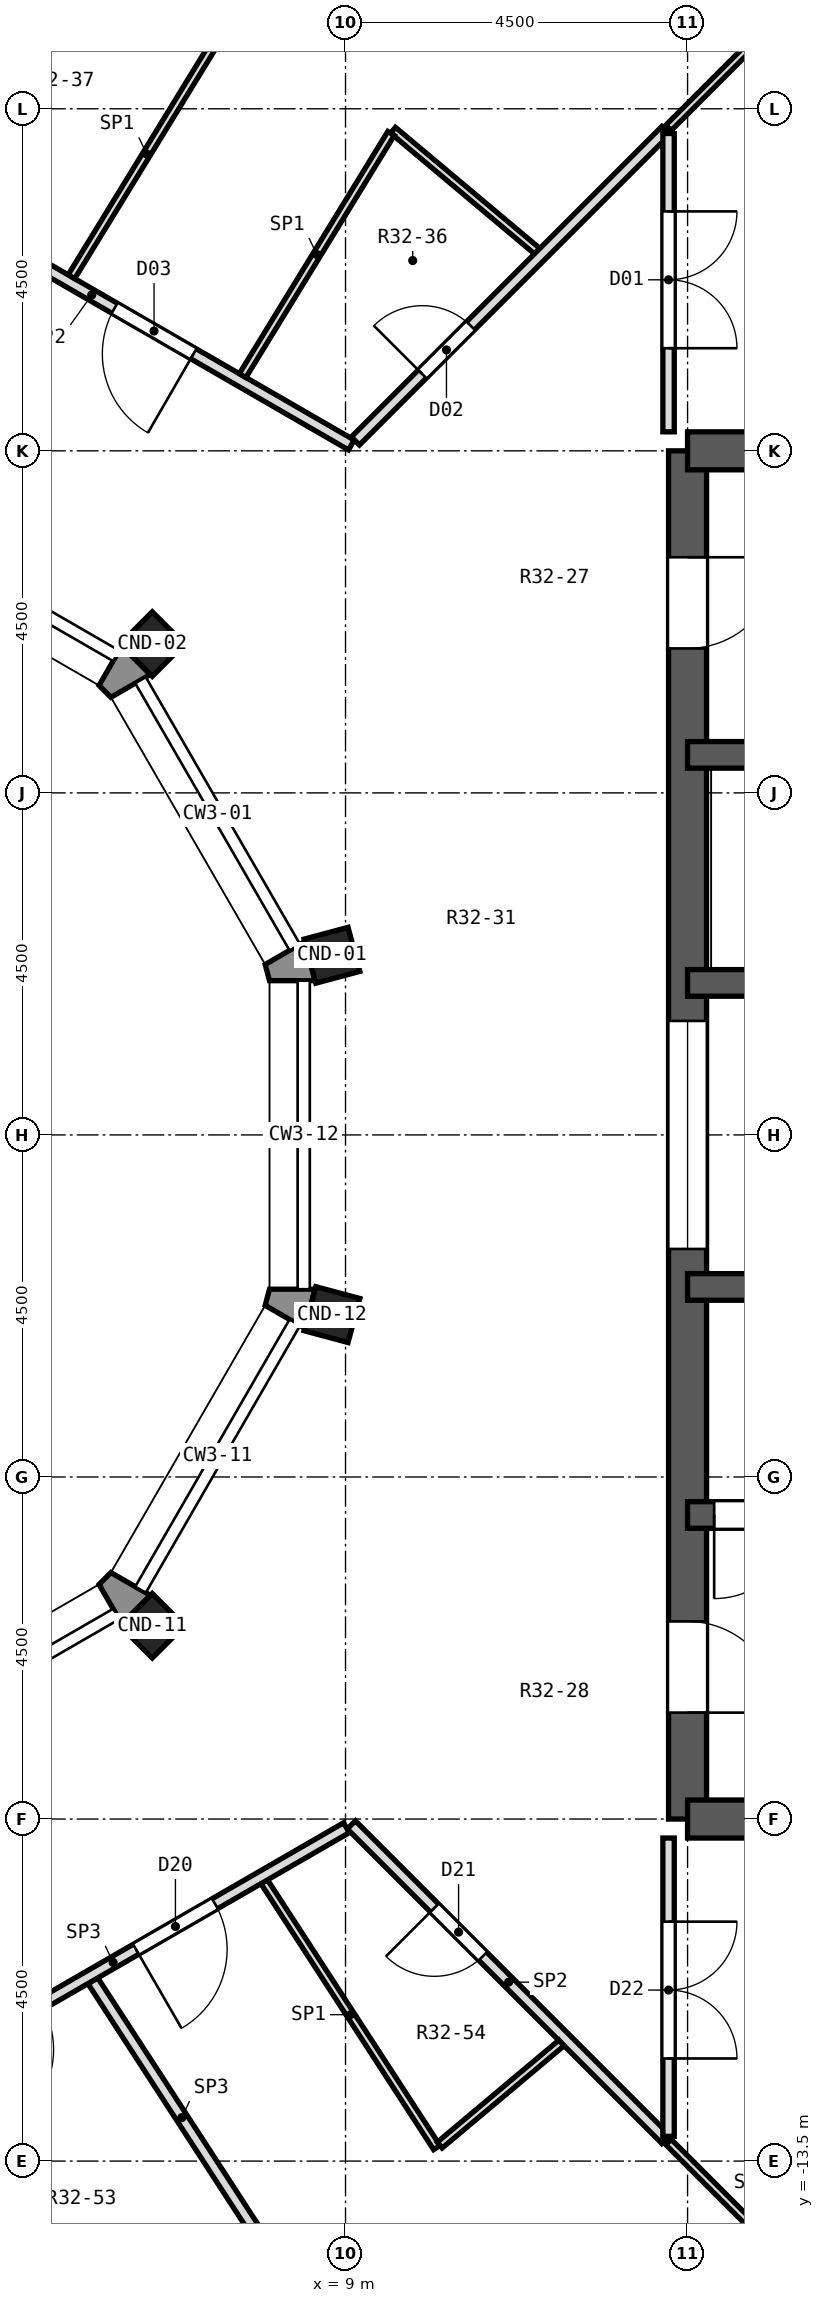
"""IFC4 building model, lengths in metres.
Left out: names, types, materials, properties, quantities, classifications, styles, units other than length and angle.
Written with IfcOpenShell. Run it as: python <this file> out.ifc"""

import sys

from ifc_helpers import new_model, si_unit, direction, frame, frame_2d, origin, origin_2d, place, context, subcontext, project, spatial, polyline, rectangle, outline, extrude, element, fill, save


model = new_model("IFC4")
c1 = context("Model", 3, precision=1e-05, world=origin(), true_north=direction((0.0, 1.0)))
c2 = subcontext(c1, "Body", "Model", "MODEL_VIEW")
j1 = project(units=[si_unit("LENGTHUNIT", "METRE"), si_unit("PLANEANGLEUNIT", "RADIAN")], contexts=[c1])
p1 = place(None, origin())
s1 = spatial("IfcSite", under=j1, at=p1, CompositionType="ELEMENT")
p2 = place(p1, origin())
s2 = spatial("IfcBuilding", under=s1, at=p2, CompositionType="ELEMENT")
p3 = place(p2, frame((0.0, 0.0, 224.7)))
s3 = spatial("IfcBuildingStorey", under=s2, at=p3, CompositionType="ELEMENT", Elevation=224.7)
for number, where, z_axis, x_axis in (
    (1, (8.821, 2.364, 0.0), (0.0, 0.0, 1.0), (0.966, 0.259, 0.0)),
    (2, (6.458, 6.458, 0.0), (0.0, 0.0, 1.0), (0.707, 0.707, 0.0)),
    (3, (6.458, -6.458, 0.0), (0.0, 0.0, 1.0), (0.707, -0.707, 0.0)),
    (4, (8.821, -2.364, 0.0), (0.0, 0.0, 1.0), (0.966, -0.259, 0.0)),
):
    element("IfcColumn", number, at=place(p3, frame(where, z_axis=z_axis, x_axis=x_axis)), inside=s3, PredefinedType="COLUMN", context=c2, shape_type="SweptSolid", body=[
        extrude(rectangle(XDim=0.6, YDim=0.6, at=origin_2d()), origin(), (0.0, 0.0, 1.0), 5.0),
    ])
p4 = place(p3, frame((13.5, -9.0, 0.0), z_axis=(0.0, 0.0, 1.0), x_axis=(0.0, 1.0, 0.0)))
e5 = element("IfcWall", 5, at=p4, inside=s3, PredefinedType="SHEAR", context=c2, shape_type="SweptSolid", body=[
    extrude(rectangle(XDim=18.0, YDim=0.5, at=frame_2d((9.0, 0.0))), origin(), (0.0, 0.0, 1.0), 5.0),
])
p5 = place(p4, frame((15.4, 0.0, 0.0)))
e6 = element("IfcOpeningElement", 6, at=p5, cuts=e5, PredefinedType="OPENING", context=c2, shape_type="SweptSolid", body=[
    extrude(rectangle(XDim=1.2, YDim=2.1, at=frame_2d((0.6, 1.05))), frame((0.0, 0.262, 0.0), z_axis=(0.0, -1.0, 0.0), x_axis=(1.0, 0.0, 0.0)), (0.0, 0.0, 1.0), 0.524),
])
p6 = place(p4, frame((1.4, 0.0, 0.0)))
e7 = element("IfcOpeningElement", 7, at=p6, cuts=e5, PredefinedType="OPENING", context=c2, shape_type="SweptSolid", body=[
    extrude(rectangle(XDim=1.2, YDim=2.1, at=frame_2d((0.6, 1.05))), frame((0.0, 0.262, 0.0), z_axis=(0.0, -1.0, 0.0), x_axis=(1.0, 0.0, 0.0)), (0.0, 0.0, 1.0), 0.524),
])
p7 = place(p4, frame((7.5, 0.0, 0.0)))
e8 = element("IfcOpeningElement", 8, at=p7, cuts=e5, PredefinedType="OPENING", context=c2, shape_type="SweptSolid", body=[
    extrude(rectangle(XDim=3.0, YDim=2.4, at=frame_2d((1.5, 1.2))), frame((0.0, 0.262, 0.0), z_axis=(0.0, -1.0, 0.0), x_axis=(1.0, 0.0, 0.0)), (0.0, 0.0, 1.0), 0.524),
])
for number, where, z_axis, x_axis in (
    (9, (13.5, 9.0, 0.0), (0.0, 0.0, 1.0), (1.0, 0.0, 0.0)),
    (10, (13.5, -9.0, 0.0), (0.0, 0.0, 1.0), (1.0, 0.0, 0.0)),
):
    element("IfcWall", number, at=place(p3, frame(where, z_axis=z_axis, x_axis=x_axis)), inside=s3, PredefinedType="SHEAR", context=c2, shape_type="SweptSolid", body=[
        extrude(rectangle(XDim=6.0, YDim=0.5, at=frame_2d((3.0, 0.0))), origin(), (0.0, 0.0, 1.0), 5.0),
    ])
p8 = place(p3, frame((13.5, 5.0, 0.0), z_axis=(0.0, 0.0, 1.0), x_axis=(1.0, 0.0, 0.0)))
e11 = element("IfcWall", 11, at=p8, inside=s3, PredefinedType="SHEAR", context=c2, shape_type="SweptSolid", body=[
    extrude(rectangle(XDim=6.0, YDim=0.35, at=frame_2d((3.0, 0.0))), origin(), (0.0, 0.0, 1.0), 5.0),
])
p9 = place(p3, frame((13.5, -5.0, 0.0), z_axis=(0.0, 0.0, 1.0), x_axis=(1.0, 0.0, 0.0)))
e12 = element("IfcWall", 12, at=p9, inside=s3, PredefinedType="SHEAR", context=c2, shape_type="SweptSolid", body=[
    extrude(rectangle(XDim=6.0, YDim=0.35, at=frame_2d((3.0, 0.0))), origin(), (0.0, 0.0, 1.0), 5.0),
])
p10 = place(p9, frame((0.35, 0.0, 0.0)))
e13 = element("IfcOpeningElement", 13, at=p10, cuts=e12, PredefinedType="OPENING", context=c2, shape_type="SweptSolid", body=[
    extrude(rectangle(XDim=1.1, YDim=2.1, at=frame_2d((0.55, 1.05))), frame((0.0, 0.187, 0.0), z_axis=(0.0, -1.0, 0.0), x_axis=(1.0, 0.0, 0.0)), (0.0, 0.0, 1.0), 0.374),
])
p11 = place(p3, frame((13.5, 2.0, 0.0), z_axis=(0.0, 0.0, 1.0), x_axis=(1.0, 0.0, 0.0)))
e14 = element("IfcWall", 14, at=p11, inside=s3, PredefinedType="SHEAR", context=c2, shape_type="SweptSolid", body=[
    extrude(rectangle(XDim=6.0, YDim=0.35, at=frame_2d((3.0, 0.0))), origin(), (0.0, 0.0, 1.0), 5.0),
])
p12 = place(p11, frame((1.37, 0.0, 0.0)))
e15 = element("IfcOpeningElement", 15, at=p12, cuts=e14, PredefinedType="OPENING", context=c2, shape_type="SweptSolid", body=[
    extrude(rectangle(XDim=1.1, YDim=2.1, at=frame_2d((0.55, 1.05))), frame((0.0, 0.187, 0.0), z_axis=(0.0, -1.0, 0.0), x_axis=(1.0, 0.0, 0.0)), (0.0, 0.0, 1.0), 0.374),
])
p13 = place(p11, frame((3.09, 0.0, 0.0)))
e16 = element("IfcOpeningElement", 16, at=p13, cuts=e14, PredefinedType="OPENING", context=c2, shape_type="SweptSolid", body=[
    extrude(rectangle(XDim=1.1, YDim=2.1, at=frame_2d((0.55, 1.05))), frame((0.0, 0.187, 0.0), z_axis=(0.0, -1.0, 0.0), x_axis=(1.0, 0.0, 0.0)), (0.0, 0.0, 1.0), 0.374),
])
p14 = place(p11, frame((5.105, 0.0, 0.0)))
e17 = element("IfcOpeningElement", 17, at=p14, cuts=e14, PredefinedType="OPENING", context=c2, shape_type="SweptSolid", body=[
    extrude(rectangle(XDim=0.6, YDim=2.1, at=frame_2d((0.3, 1.05))), frame((0.0, 0.187, 0.0), z_axis=(0.0, -1.0, 0.0), x_axis=(1.0, 0.0, 0.0)), (0.0, 0.0, 1.0), 0.374),
])
p15 = place(p3, frame((13.5, -2.0, 0.0), z_axis=(0.0, 0.0, 1.0), x_axis=(1.0, 0.0, 0.0)))
e18 = element("IfcWall", 18, at=p15, inside=s3, PredefinedType="SHEAR", context=c2, shape_type="SweptSolid", body=[
    extrude(rectangle(XDim=6.0, YDim=0.35, at=frame_2d((3.0, 0.0))), origin(), (0.0, 0.0, 1.0), 5.0),
])
p16 = place(p15, frame((1.14, 0.0, 0.0)))
e19 = element("IfcOpeningElement", 19, at=p16, cuts=e18, PredefinedType="OPENING", context=c2, shape_type="SweptSolid", body=[
    extrude(rectangle(XDim=1.0, YDim=2.1, at=frame_2d((0.5, 1.05))), frame((0.0, 0.187, 0.0), z_axis=(0.0, -1.0, 0.0), x_axis=(1.0, 0.0, 0.0)), (0.0, 0.0, 1.0), 0.374),
])
p17 = place(p3, origin())
e20 = element("IfcWall", 20, at=p17, inside=s3, PredefinedType="SOLIDWALL", context=c2, shape_type="SweptSolid", body=[
    extrude(outline(polyline([(8.462, 2.542), (7.943, 2.242), (8.0, 2.029), (8.6, 2.029), (8.462, 2.542)])), origin(), (0.0, 0.0, 1.0), 4.6),
])
p18 = place(p3, origin())
e21 = element("IfcWall", 21, at=p18, inside=s3, PredefinedType="SOLIDWALL", context=c2, shape_type="SweptSolid", body=[
    extrude(outline(polyline([(6.058, 6.433), (5.758, 5.914), (5.914, 5.758), (6.433, 6.058), (6.058, 6.433)])), origin(), (0.0, 0.0, 1.0), 4.6),
])
p19 = place(p3, origin())
e22 = element("IfcWall", 22, at=p19, inside=s3, PredefinedType="SOLIDWALL", context=c2, shape_type="SweptSolid", body=[
    extrude(outline(polyline([(6.433, -6.058), (5.914, -5.758), (5.758, -5.914), (6.058, -6.433), (6.433, -6.058)])), origin(), (0.0, 0.0, 1.0), 4.6),
])
p20 = place(p3, origin())
e23 = element("IfcWall", 23, at=p20, inside=s3, PredefinedType="SOLIDWALL", context=c2, shape_type="SweptSolid", body=[
    extrude(outline(polyline([(8.6, -2.029), (8.0, -2.029), (7.943, -2.242), (8.462, -2.542), (8.6, -2.029)])), origin(), (0.0, 0.0, 1.0), 4.6),
])
p21 = place(p3, frame((5.676, -11.128, 0.0), z_axis=(0.0, 0.0, 1.0), x_axis=(0.544832434593, -0.838544941083, 0.0)))
e24 = element("IfcWall", 24, at=p21, inside=s3, PredefinedType="PARTITIONING", context=c2, shape_type="SweptSolid", body=[
    extrude(rectangle(XDim=4.293, YDim=0.15, at=frame_2d((2.146, 0.0))), origin(), (0.0, 0.0, 1.0), 4.6),
])
p22 = place(p3, frame((7.931, -9.826, 0.0), z_axis=(0.0, 0.0, 1.0), x_axis=(0.544576550515, -0.838711142545, 0.0)))
e25 = element("IfcWall", 25, at=p22, inside=s3, PredefinedType="PARTITIONING", context=c2, shape_type="SweptSolid", body=[
    extrude(rectangle(XDim=4.168, YDim=0.1, at=frame_2d((2.084, 0.0))), origin(), (0.0, 0.0, 1.0), 4.6),
])
p23 = place(p3, frame((13.25, -13.25, 0.0), z_axis=(0.0, 0.0, 1.0), x_axis=(0.707106781187, -0.707106781187, 0.0)))
e26 = element("IfcWall", 26, at=p23, inside=s3, PredefinedType="PARTITIONING", context=c2, shape_type="SweptSolid", body=[
    extrude(rectangle(XDim=3.077, YDim=0.1, at=frame_2d((1.538, 0.0))), origin(), (0.0, 0.0, 1.0), 4.6),
])
p24 = place(p3, frame((9.077, -9.077, 0.0), z_axis=(0.0, 0.0, 1.0), x_axis=(0.707106781187, -0.707106781187, 0.0)))
e27 = element("IfcWall", 27, at=p24, inside=s3, PredefinedType="PARTITIONING", context=c2, shape_type="SweptSolid", body=[
    extrude(rectangle(XDim=5.852, YDim=0.15, at=frame_2d((2.926, 0.0))), origin(), (0.0, 0.0, 1.0), 4.6),
])
p25 = place(p24, frame((1.545, 0.0, 0.0)))
e28 = element("IfcOpeningElement", 28, at=p25, cuts=e27, PredefinedType="OPENING", context=c2, shape_type="SweptSolid", body=[
    extrude(rectangle(XDim=0.9, YDim=2.1, at=frame_2d((0.45, 1.05))), frame((0.0, 0.087, 0.0), z_axis=(0.0, -1.0, 0.0), x_axis=(1.0, 0.0, 0.0)), (0.0, 0.0, 1.0), 0.174),
])
p26 = place(p3, frame((9.625, 13.218, 0.0), z_axis=(0.0, 0.0, 1.0), x_axis=(0.766147679589, -0.642664557184, 0.0)))
e29 = element("IfcWall", 29, at=p26, inside=s3, PredefinedType="PARTITIONING", context=c2, shape_type="SweptSolid", body=[
    extrude(rectangle(XDim=2.475, YDim=0.1, at=frame_2d((1.238, 0.0))), origin(), (0.0, 0.0, 1.0), 4.6),
])
p27 = place(p3, frame((3.323, 12.4, 0.0), z_axis=(0.0, 0.0, 1.0), x_axis=(0.865961614908, -0.500110469302, 0.0)))
e30 = element("IfcWall", 30, at=p27, inside=s3, PredefinedType="PARTITIONING", context=c2, shape_type="SweptSolid", body=[
    extrude(rectangle(XDim=6.645, YDim=0.15, at=frame_2d((3.322, 0.0))), origin(), (0.0, 0.0, 1.0), 4.6),
])
p28 = place(p27, frame((3.047, 0.0, 0.0)))
e31 = element("IfcOpeningElement", 31, at=p28, cuts=e30, PredefinedType="OPENING", context=c2, shape_type="SweptSolid", body=[
    extrude(rectangle(XDim=1.2, YDim=2.1, at=frame_2d((0.6, 1.05))), frame((0.0, 0.087, 0.0), z_axis=(0.0, -1.0, 0.0), x_axis=(1.0, 0.0, 0.0)), (0.0, 0.0, 1.0), 0.174),
])
p29 = place(p27, frame((0.723, 0.0, 0.0)))
e32 = element("IfcOpeningElement", 32, at=p29, cuts=e30, PredefinedType="OPENING", context=c2, shape_type="SweptSolid", body=[
    extrude(rectangle(XDim=0.9, YDim=2.1, at=frame_2d((0.45, 1.05))), frame((0.0, 0.087, 0.0), z_axis=(0.0, -1.0, 0.0), x_axis=(1.0, 0.0, 0.0)), (0.0, 0.0, 1.0), 0.174),
])
p30 = place(p3, frame((3.388, -12.363, 0.0), z_axis=(0.0, 0.0, 1.0), x_axis=(0.865967095912, 0.5001009786, 0.0)))
e33 = element("IfcWall", 33, at=p30, inside=s3, PredefinedType="PARTITIONING", context=c2, shape_type="SweptSolid", body=[
    extrude(rectangle(XDim=6.495, YDim=0.15, at=frame_2d((3.248, 0.0))), origin(), (0.0, 0.0, 1.0), 4.6),
])
p31 = place(p30, frame((0.66, 0.0, 0.0)))
e34 = element("IfcOpeningElement", 34, at=p31, cuts=e33, PredefinedType="OPENING", context=c2, shape_type="SweptSolid", body=[
    extrude(rectangle(XDim=1.2, YDim=2.1, at=frame_2d((0.6, 1.05))), frame((0.0, 0.087, 0.0), z_axis=(0.0, -1.0, 0.0), x_axis=(1.0, 0.0, 0.0)), (0.0, 0.0, 1.0), 0.174),
])
p32 = place(p30, frame((3.297, 0.0, 0.0)))
e35 = element("IfcOpeningElement", 35, at=p32, cuts=e33, PredefinedType="OPENING", context=c2, shape_type="SweptSolid", body=[
    extrude(rectangle(XDim=1.2, YDim=2.1, at=frame_2d((0.6, 1.05))), frame((0.0, 0.087, 0.0), z_axis=(0.0, -1.0, 0.0), x_axis=(1.0, 0.0, 0.0)), (0.0, 0.0, 1.0), 0.174),
])
p33 = place(p3, frame((10.239, -13.29, 0.0), z_axis=(0.0, 0.0, 1.0), x_axis=(0.766082082368, 0.642742750308, 0.0)))
e36 = element("IfcWall", 36, at=p33, inside=s3, PredefinedType="PARTITIONING", context=c2, shape_type="SweptSolid", body=[
    extrude(rectangle(XDim=2.09, YDim=0.1, at=frame_2d((1.045, 0.0))), origin(), (0.0, 0.0, 1.0), 4.6),
])
p34 = place(p3, frame((13.25, 13.25, 0.0), z_axis=(0.0, 0.0, 1.0), x_axis=(0.707106781187, 0.707106781187, 0.0)))
e37 = element("IfcWall", 37, at=p34, inside=s3, PredefinedType="PARTITIONING", context=c2, shape_type="SweptSolid", body=[
    extrude(rectangle(XDim=3.077, YDim=0.1, at=frame_2d((1.538, 0.0))), origin(), (0.0, 0.0, 1.0), 4.6),
])
p35 = place(p3, frame((9.13, 9.13, 0.0), z_axis=(0.0, 0.0, 1.0), x_axis=(0.707106781187, 0.707106781187, 0.0)))
e38 = element("IfcWall", 38, at=p35, inside=s3, PredefinedType="PARTITIONING", context=c2, shape_type="SweptSolid", body=[
    extrude(rectangle(XDim=5.777, YDim=0.15, at=frame_2d((2.888, 0.0))), origin(), (0.0, 0.0, 1.0), 4.6),
])
p36 = place(p35, frame((1.244, 0.0, 0.0)))
e39 = element("IfcOpeningElement", 39, at=p36, cuts=e38, PredefinedType="OPENING", context=c2, shape_type="SweptSolid", body=[
    extrude(rectangle(XDim=0.9, YDim=2.1, at=frame_2d((0.45, 1.05))), frame((0.0, 0.087, 0.0), z_axis=(0.0, -1.0, 0.0), x_axis=(1.0, 0.0, 0.0)), (0.0, 0.0, 1.0), 0.174),
])
p37 = place(p3, frame((7.646, 9.99, 0.0), z_axis=(0.0, 0.0, 1.0), x_axis=(0.522631009754, 0.852558987779, 0.0)))
e40 = element("IfcWall", 40, at=p37, inside=s3, PredefinedType="PARTITIONING", context=c2, shape_type="SweptSolid", body=[
    extrude(rectangle(XDim=3.736, YDim=0.1, at=frame_2d((1.868, 0.0))), origin(), (0.0, 0.0, 1.0), 4.6),
])
p38 = place(p3, frame((5.394, 11.291, 0.0), z_axis=(0.0, 0.0, 1.0), x_axis=(0.522471391937, 0.852656815259, 0.0)))
e41 = element("IfcWall", 41, at=p38, inside=s3, PredefinedType="PARTITIONING", context=c2, shape_type="SweptSolid", body=[
    extrude(rectangle(XDim=3.789, YDim=0.1, at=frame_2d((1.895, 0.0))), origin(), (0.0, 0.0, 1.0), 4.6),
])
p39 = place(p3, frame((3.342, 12.472, 0.0), z_axis=(0.0, 0.0, 1.0), x_axis=(0.258684909749, 0.965961757767, 0.0)))
e42 = element("IfcWall", 42, at=p39, inside=s3, PredefinedType="PARTITIONING", context=c2, shape_type="SweptSolid", body=[
    extrude(rectangle(XDim=8.903, YDim=0.1, at=frame_2d((4.451, 0.0))), origin(), (0.0, 0.0, 1.0), 4.6),
])
p40 = place(p3, frame((13.25, -13.175, 0.0), z_axis=(0.0, 0.0, 1.0), x_axis=(0.0, 1.0, 0.0)))
e43 = element("IfcWall", 43, at=p40, inside=s3, PredefinedType="PARTITIONING", context=c2, shape_type="SweptSolid", body=[
    extrude(rectangle(XDim=3.925, YDim=0.15, at=frame_2d((1.962, 0.0))), origin(), (0.0, 0.0, 1.0), 4.6),
])
p41 = place(p40, frame((1.025, 0.0, 0.0)))
e44 = element("IfcOpeningElement", 44, at=p41, cuts=e43, PredefinedType="OPENING", context=c2, shape_type="SweptSolid", body=[
    extrude(rectangle(XDim=1.8, YDim=2.1, at=frame_2d((0.9, 1.05))), frame((0.0, 0.087, 0.0), z_axis=(0.0, -1.0, 0.0), x_axis=(1.0, 0.0, 0.0)), (0.0, 0.0, 1.0), 0.174),
])
p42 = place(p3, frame((13.25, 9.25, 0.0), z_axis=(0.0, 0.0, 1.0), x_axis=(0.0, 1.0, 0.0)))
e45 = element("IfcWall", 45, at=p42, inside=s3, PredefinedType="PARTITIONING", context=c2, shape_type="SweptSolid", body=[
    extrude(rectangle(XDim=3.925, YDim=0.15, at=frame_2d((1.962, 0.0))), origin(), (0.0, 0.0, 1.0), 4.6),
])
p43 = place(p42, frame((1.1, 0.0, 0.0)))
e46 = element("IfcOpeningElement", 46, at=p43, cuts=e45, PredefinedType="OPENING", context=c2, shape_type="SweptSolid", body=[
    extrude(rectangle(XDim=1.8, YDim=2.1, at=frame_2d((0.9, 1.05))), frame((0.0, 0.087, 0.0), z_axis=(0.0, -1.0, 0.0), x_axis=(1.0, 0.0, 0.0)), (0.0, 0.0, 1.0), 0.174),
])
p44 = place(p43, frame((1.8, 0.0, 0.0), z_axis=(0.0, 0.0, 1.0), x_axis=(-1.0, 0.0, 0.0)))
e47 = element("IfcDoor", 47, at=p44, inside=s3, OperationType="DOUBLE_DOOR_SINGLE_SWING", PredefinedType="DOOR", context=c2, shape_type="SweptSolid", body=[
    extrude(rectangle(XDim=1.8, YDim=2.1, at=frame_2d((0.9, 1.05))), frame((0.0, 0.025, 0.0), z_axis=(0.0, -1.0, 0.0), x_axis=(1.0, 0.0, 0.0)), (0.0, 0.0, 1.0), 0.05),
])
fill(e46, e47)
p45 = place(p36, origin())
e48 = element("IfcDoor", 48, at=p45, inside=s3, OperationType="SINGLE_SWING_LEFT", PredefinedType="DOOR", context=c2, shape_type="SweptSolid", body=[
    extrude(rectangle(XDim=0.9, YDim=2.1, at=frame_2d((0.45, 1.05))), frame((0.0, 0.025, 0.0), z_axis=(0.0, -1.0, 0.0), x_axis=(1.0, 0.0, 0.0)), (0.0, 0.0, 1.0), 0.05),
])
fill(e39, e48)
p46 = place(p28, frame((1.2, 0.0, 0.0), z_axis=(0.0, 0.0, 1.0), x_axis=(-1.0, 0.0, 0.0)))
e49 = element("IfcDoor", 49, at=p46, inside=s3, OperationType="SINGLE_SWING_LEFT", PredefinedType="DOOR", context=c2, shape_type="SweptSolid", body=[
    extrude(rectangle(XDim=1.2, YDim=2.1, at=frame_2d((0.6, 1.05))), frame((0.0, 0.025, 0.0), z_axis=(0.0, -1.0, 0.0), x_axis=(1.0, 0.0, 0.0)), (0.0, 0.0, 1.0), 0.05),
])
fill(e31, e49)
p47 = place(p32, frame((1.2, 0.0, 0.0), z_axis=(0.0, 0.0, 1.0), x_axis=(-1.0, 0.0, 0.0)))
e50 = element("IfcDoor", 50, at=p47, inside=s3, OperationType="SINGLE_SWING_RIGHT", PredefinedType="DOOR", context=c2, shape_type="SweptSolid", body=[
    extrude(rectangle(XDim=1.2, YDim=2.1, at=frame_2d((0.6, 1.05))), frame((0.0, 0.025, 0.0), z_axis=(0.0, -1.0, 0.0), x_axis=(1.0, 0.0, 0.0)), (0.0, 0.0, 1.0), 0.05),
])
fill(e35, e50)
p48 = place(p25, frame((0.9, 0.0, 0.0), z_axis=(0.0, 0.0, 1.0), x_axis=(-1.0, 0.0, 0.0)))
e51 = element("IfcDoor", 51, at=p48, inside=s3, OperationType="SINGLE_SWING_RIGHT", PredefinedType="DOOR", context=c2, shape_type="SweptSolid", body=[
    extrude(rectangle(XDim=0.9, YDim=2.1, at=frame_2d((0.45, 1.05))), frame((0.0, 0.025, 0.0), z_axis=(0.0, -1.0, 0.0), x_axis=(1.0, 0.0, 0.0)), (0.0, 0.0, 1.0), 0.05),
])
fill(e28, e51)
p49 = place(p41, frame((1.8, 0.0, 0.0), z_axis=(0.0, 0.0, 1.0), x_axis=(-1.0, 0.0, 0.0)))
e52 = element("IfcDoor", 52, at=p49, inside=s3, OperationType="DOUBLE_DOOR_SINGLE_SWING", PredefinedType="DOOR", context=c2, shape_type="SweptSolid", body=[
    extrude(rectangle(XDim=1.8, YDim=2.1, at=frame_2d((0.9, 1.05))), frame((0.0, 0.025, 0.0), z_axis=(0.0, -1.0, 0.0), x_axis=(1.0, 0.0, 0.0)), (0.0, 0.0, 1.0), 0.05),
])
fill(e44, e52)
p50 = place(p10, frame((1.1, 0.0, 0.0), z_axis=(0.0, 0.0, 1.0), x_axis=(-1.0, 0.0, 0.0)))
e53 = element("IfcDoor", 53, at=p50, inside=s3, OperationType="SINGLE_SWING_RIGHT", PredefinedType="DOOR", context=c2, shape_type="SweptSolid", body=[
    extrude(rectangle(XDim=1.1, YDim=2.1, at=frame_2d((0.55, 1.05))), frame((0.0, 0.025, 0.0), z_axis=(0.0, -1.0, 0.0), x_axis=(1.0, 0.0, 0.0)), (0.0, 0.0, 1.0), 0.05),
])
fill(e13, e53)
p51 = place(p5, frame((1.2, 0.0, 0.0), z_axis=(0.0, 0.0, 1.0), x_axis=(-1.0, 0.0, 0.0)))
e54 = element("IfcDoor", 54, at=p51, inside=s3, OperationType="SINGLE_SWING_LEFT", PredefinedType="DOOR", context=c2, shape_type="SweptSolid", body=[
    extrude(rectangle(XDim=1.2, YDim=2.1, at=frame_2d((0.6, 1.05))), frame((0.0, 0.025, 0.0), z_axis=(0.0, -1.0, 0.0), x_axis=(1.0, 0.0, 0.0)), (0.0, 0.0, 1.0), 0.05),
])
fill(e6, e54)
p52 = place(p6, frame((1.2, 0.0, 0.0), z_axis=(0.0, 0.0, 1.0), x_axis=(-1.0, 0.0, 0.0)))
e55 = element("IfcDoor", 55, at=p52, inside=s3, OperationType="SINGLE_SWING_RIGHT", PredefinedType="DOOR", context=c2, shape_type="SweptSolid", body=[
    extrude(rectangle(XDim=1.2, YDim=2.1, at=frame_2d((0.6, 1.05))), frame((0.0, 0.025, 0.0), z_axis=(0.0, -1.0, 0.0), x_axis=(1.0, 0.0, 0.0)), (0.0, 0.0, 1.0), 0.05),
])
fill(e7, e55)
p53 = place(p7, origin())
e56 = element("IfcDoor", 56, at=p53, inside=s3, OperationType="DOUBLE_DOOR_SLIDING", PredefinedType="DOOR", context=c2, shape_type="SweptSolid", body=[
    extrude(rectangle(XDim=3.0, YDim=2.4, at=frame_2d((1.5, 1.2))), frame((0.0, 0.025, 0.0), z_axis=(0.0, -1.0, 0.0), x_axis=(1.0, 0.0, 0.0)), (0.0, 0.0, 1.0), 0.05),
])
fill(e8, e56)
save(model, sys.argv[1])
